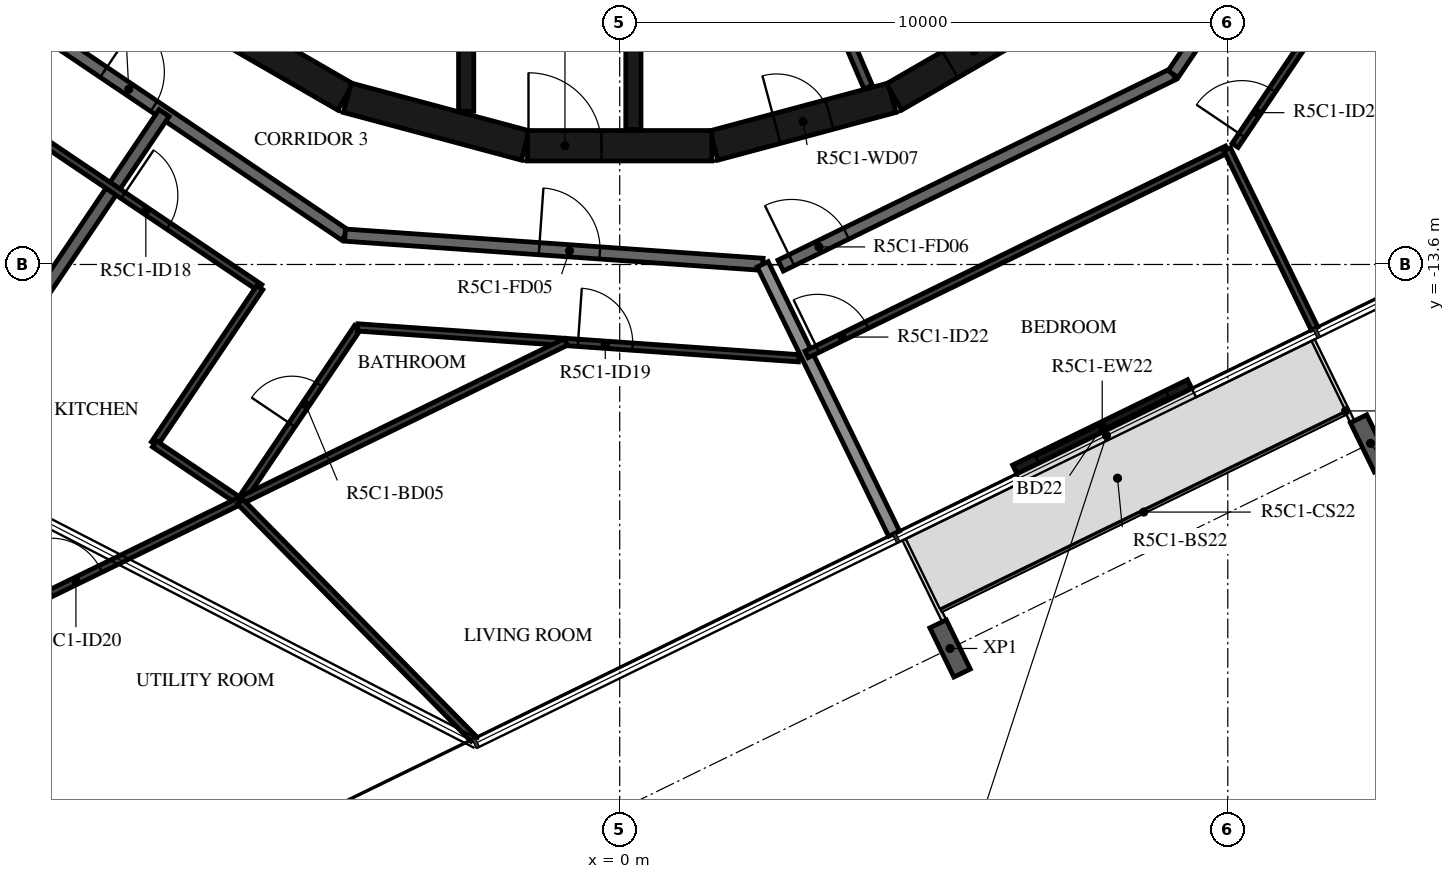
"""IFC4 building model, lengths in metres.
Left out: names, types, materials, properties, quantities, classifications, styles, units other than length and angle.
Written with IfcOpenShell. Run it as: python <this file> out.ifc"""

import sys

from ifc_helpers import new_model, si_unit, direction, frame, frame_2d, origin, origin_2d, place, context, subcontext, project, spatial, rectangle, i_section, extrude, element, fill, save


model = new_model("IFC4")
c1 = context("Model", 3, precision=1e-05, world=origin(), true_north=direction((0.0, 1.0)))
c2 = subcontext(c1, "Body", "Model", "MODEL_VIEW")
j1 = project(units=[si_unit("LENGTHUNIT", "METRE"), si_unit("PLANEANGLEUNIT", "RADIAN")], contexts=[c1])
p1 = place(None, origin())
s1 = spatial("IfcSite", under=j1, at=p1, CompositionType="ELEMENT")
p2 = place(p1, origin())
s2 = spatial("IfcBuilding", under=s1, at=p2, CompositionType="ELEMENT")
p3 = place(p2, frame((0.0, 0.0, 212.9)))
s3 = spatial("IfcBuildingStorey", under=s2, at=p3, CompositionType="ELEMENT", Elevation=212.9)
for number, where, z_axis, x_axis in (
    (1, (12.348, -16.542, -0.38), (0.0, 0.0, 1.0), (-0.899, -0.438, 0.0)),
    (2, (5.433, -19.915, -0.38), (0.0, 0.0, 1.0), (-0.899, -0.438, 0.0)),
):
    element("IfcColumn", number, at=place(p3, frame(where, z_axis=z_axis, x_axis=x_axis)), inside=s3, PredefinedType="COLUMN", context=c2, shape_type="SweptSolid", body=[
        extrude(i_section(OverallWidth=0.3, OverallDepth=0.9, WebThickness=0.019, FlangeThickness=0.035, FilletRadius=0.03, at=origin_2d()), origin(), (0.0, 0.0, 1.0), 3.5),
    ])
p4 = place(p3, frame((6.497, -16.97, 0.0), z_axis=(0.0, 0.0, 1.0), x_axis=(0.898778711213, 0.43840258698, 0.0)))
e3 = element("IfcWall", 3, at=p4, inside=s3, PredefinedType="STANDARD", context=c2, shape_type="SweptSolid", body=[
    extrude(rectangle(XDim=3.2, YDim=0.16, at=frame_2d((1.6, 0.0))), origin(), (0.0, 0.0, 1.0), 3.12),
])
p5 = place(p4, frame((0.4, 0.0, 0.0)))
e4 = element("IfcOpeningElement", 4, at=p5, cuts=e3, PredefinedType="OPENING", context=c2, shape_type="SweptSolid", body=[
    extrude(rectangle(XDim=2.4, YDim=2.4, at=frame_2d((1.2, 1.2))), frame((0.0, 0.09, 0.0), z_axis=(0.0, -1.0, 0.0), x_axis=(1.0, 0.0, 0.0)), (0.0, 0.0, 1.0), 0.18),
])
p6 = place(p3, frame((1.55, -11.643, 0.0), z_axis=(0.0, 0.0, 1.0), x_axis=(0.965948410781, 0.258734743916, 0.0)))
e5 = element("IfcWall", 5, at=p6, inside=s3, PredefinedType="SHEAR", context=c2, shape_type="SweptSolid", body=[
    extrude(rectangle(XDim=3.033, YDim=0.5, at=frame_2d((1.516, 0.0))), origin(), (0.0, 0.0, 1.0), 3.12),
])
p7 = place(p6, frame((1.066, 0.0, 0.0)))
e6 = element("IfcOpeningElement", 6, at=p7, cuts=e5, PredefinedType="OPENING", context=c2, shape_type="SweptSolid", body=[
    extrude(rectangle(XDim=0.9, YDim=2.1, at=frame_2d((0.45, 1.05))), frame((0.0, 0.26, 0.0), z_axis=(0.0, -1.0, 0.0), x_axis=(1.0, 0.0, 0.0)), (0.0, 0.0, 1.0), 0.52),
])
p8 = place(p3, frame((4.51, -10.845, 0.0), z_axis=(0.0, 0.0, 1.0), x_axis=(0.865975092491, 0.500087131594, 0.0)))
e7 = element("IfcWall", 7, at=p8, inside=s3, PredefinedType="SHEAR", context=c2, shape_type="SweptSolid", body=[
    extrude(rectangle(XDim=3.033, YDim=0.5, at=frame_2d((1.516, 0.0))), origin(), (0.0, 0.0, 1.0), 3.12),
])
p9 = place(p8, frame((1.066, 0.0, 0.0)))
e8 = element("IfcOpeningElement", 8, at=p9, cuts=e7, PredefinedType="OPENING", context=c2, shape_type="SweptSolid", body=[
    extrude(rectangle(XDim=0.9, YDim=2.1, at=frame_2d((0.45, 1.05))), frame((0.0, 0.26, 0.0), z_axis=(0.0, -1.0, 0.0), x_axis=(1.0, 0.0, 0.0)), (0.0, 0.0, 1.0), 0.52),
])
for number, where, z_axis, x_axis in (
    (9, (-7.137, -9.329, 0.0), (0.0, 0.0, 1.0), (0.866, -0.5, 0.0)),
    (10, (-4.479, -10.858, 0.0), (0.0, 0.0, 1.0), (0.966, -0.259, 0.0)),
):
    element("IfcWall", number, at=place(p3, frame(where, z_axis=z_axis, x_axis=x_axis)), inside=s3, PredefinedType="SHEAR", context=c2, shape_type="SweptSolid", body=[
        extrude(rectangle(XDim=3.033, YDim=0.5, at=frame_2d((1.516, 0.0))), origin(), (0.0, 0.0, 1.0), 3.12),
    ])
p10 = place(p3, frame((-1.516, -11.647, 0.0), z_axis=(0.0, 0.0, 1.0), x_axis=(1.0, 0.0, 0.0)))
e11 = element("IfcWall", 11, at=p10, inside=s3, PredefinedType="SHEAR", context=c2, shape_type="SweptSolid", body=[
    extrude(rectangle(XDim=3.033, YDim=0.5, at=frame_2d((1.516, 0.0))), origin(), (0.0, 0.0, 1.0), 3.12),
])
p11 = place(p10, frame((0.016, 0.0, 0.0)))
e12 = element("IfcOpeningElement", 12, at=p11, cuts=e11, PredefinedType="OPENING", context=c2, shape_type="SweptSolid", body=[
    extrude(rectangle(XDim=1.2, YDim=2.1, at=frame_2d((0.6, 1.05))), frame((0.0, 0.26, 0.0), z_axis=(0.0, -1.0, 0.0), x_axis=(1.0, 0.0, 0.0)), (0.0, 0.0, 1.0), 0.52),
])
p12 = place(p3, frame((-2.525, -8.97, 0.0), z_axis=(0.0, 0.0, 1.0), x_axis=(0.0, -1.0, 0.0)))
e13 = element("IfcWall", 13, at=p12, inside=s3, PredefinedType="SHEAR", context=c2, shape_type="SweptSolid", body=[
    extrude(rectangle(XDim=2.11, YDim=0.25, at=frame_2d((1.055, 0.0))), origin(), (0.0, 0.0, 1.0), 3.12),
])
p13 = place(p3, frame((0.225, -8.97, 0.0), z_axis=(0.0, 0.0, 1.0), x_axis=(0.0, -1.0, 0.0)))
e14 = element("IfcWall", 14, at=p13, inside=s3, PredefinedType="SHEAR", context=c2, shape_type="SweptSolid", body=[
    extrude(rectangle(XDim=2.41, YDim=0.25, at=frame_2d((1.205, 0.0))), origin(), (0.0, 0.0, 1.0), 3.12),
])
p14 = place(p3, frame((3.367, -9.007, 0.0), z_axis=(0.0, 0.0, 1.0), x_axis=(0.394387482265, -0.918944238696, 0.0)))
e15 = element("IfcWall", 15, at=p14, inside=s3, PredefinedType="PARTITIONING", context=c2, shape_type="SweptSolid", body=[
    extrude(rectangle(XDim=1.825, YDim=0.15, at=frame_2d((0.913, 0.0))), origin(), (0.0, 0.0, 1.0), 3.12),
])
p15 = place(p3, frame((-10.47, -9.101, 0.0), z_axis=(0.0, 0.0, 1.0), x_axis=(0.829035841718, -0.559195469534, 0.0)))
e16 = element("IfcWall", 16, at=p15, inside=s3, PredefinedType="STANDARD", context=c2, shape_type="SweptSolid", body=[
    extrude(rectangle(XDim=7.181, YDim=0.2, at=frame_2d((3.591, 0.0))), origin(), (0.0, 0.0, 1.0), 3.12),
])
p16 = place(p15, frame((2.39, 0.0, 0.0)))
e17 = element("IfcOpeningElement", 17, at=p16, cuts=e16, PredefinedType="OPENING", context=c2, shape_type="SweptSolid", body=[
    extrude(rectangle(XDim=1.0, YDim=2.1, at=frame_2d((0.5, 1.05))), frame((0.0, 0.11, 0.0), z_axis=(0.0, -1.0, 0.0), x_axis=(1.0, 0.0, 0.0)), (0.0, 0.0, 1.0), 0.22),
])
p17 = place(p3, frame((-4.517, -13.117, 0.0), z_axis=(0.0, 0.0, 1.0), x_axis=(0.997564669554, -0.069747616856, 0.0)))
e18 = element("IfcWall", 18, at=p17, inside=s3, PredefinedType="STANDARD", context=c2, shape_type="SweptSolid", body=[
    extrude(rectangle(XDim=6.885, YDim=0.2, at=frame_2d((3.443, 0.0))), origin(), (0.0, 0.0, 1.0), 3.12),
])
p18 = place(p17, frame((3.2, 0.0, 0.0)))
e19 = element("IfcOpeningElement", 19, at=p18, cuts=e18, PredefinedType="OPENING", context=c2, shape_type="SweptSolid", body=[
    extrude(rectangle(XDim=1.0, YDim=2.1, at=frame_2d((0.5, 1.05))), frame((0.0, 0.11, 0.0), z_axis=(0.0, -1.0, 0.0), x_axis=(1.0, 0.0, 0.0)), (0.0, 0.0, 1.0), 0.22),
])
p19 = place(p3, frame((2.647, -13.618, 0.0), z_axis=(0.0, 0.0, 1.0), x_axis=(0.898796543751, 0.438366026218, 0.0)))
e20 = element("IfcWall", 20, at=p19, inside=s3, PredefinedType="STANDARD", context=c2, shape_type="SweptSolid", body=[
    extrude(rectangle(XDim=7.181, YDim=0.2, at=frame_2d((3.591, 0.0))), origin(), (0.0, 0.0, 1.0), 3.12),
])
p20 = place(p19, frame((0.2, 0.0, 0.0)))
e21 = element("IfcOpeningElement", 21, at=p20, cuts=e20, PredefinedType="OPENING", context=c2, shape_type="SweptSolid", body=[
    extrude(rectangle(XDim=1.0, YDim=2.1, at=frame_2d((0.5, 1.05))), frame((0.0, 0.11, 0.0), z_axis=(0.0, -1.0, 0.0), x_axis=(1.0, 0.0, 0.0)), (0.0, 0.0, 1.0), 0.22),
])
p21 = place(p3, frame((9.101, -10.47, 0.0), z_axis=(0.0, 0.0, 1.0), x_axis=(0.559195469534, 0.829035841718, 0.0)))
e22 = element("IfcWall", 22, at=p21, inside=s3, PredefinedType="STANDARD", context=c2, shape_type="SweptSolid", body=[
    extrude(rectangle(XDim=7.181, YDim=0.2, at=frame_2d((3.591, 0.0))), origin(), (0.0, 0.0, 1.0), 3.12),
])
p22 = place(p3, frame((-10.408, -15.43, 0.0), z_axis=(0.0, 0.0, 1.0), x_axis=(0.559199317758, 0.829033246027, 0.0)))
e23 = element("IfcWall", 23, at=p22, inside=s3, PredefinedType="STANDARD", context=c2, shape_type="SweptSolid", body=[
    extrude(rectangle(XDim=5.212, YDim=0.2, at=frame_2d((2.606, 0.0))), origin(), (0.0, 0.0, 1.0), 3.12),
])
p23 = place(p3, frame((4.512, -18.027, 0.0), z_axis=(0.0, 0.0, 1.0), x_axis=(-0.438374835386, 0.898792247241, 0.0)))
e24 = element("IfcWall", 24, at=p23, inside=s3, PredefinedType="STANDARD", context=c2, shape_type="SweptSolid", body=[
    extrude(rectangle(XDim=4.929, YDim=0.2, at=frame_2d((2.464, 0.0))), origin(), (0.0, 0.0, 1.0), 2.73),
])
p24 = place(p3, frame((-11.642, -10.12, 0.0), z_axis=(0.0, 0.0, 1.0), x_axis=(0.829029427133, -0.559204979365, 0.0)))
e25 = element("IfcWall", 25, at=p24, inside=s3, PredefinedType="PARTITIONING", context=c2, shape_type="SweptSolid", body=[
    extrude(rectangle(XDim=6.904, YDim=0.12, at=frame_2d((3.452, 0.0))), origin(), (0.0, 0.0, 1.0), 3.12),
])
p25 = place(p24, frame((0.2, 0.0, 0.0)))
e26 = element("IfcOpeningElement", 26, at=p25, cuts=e25, PredefinedType="OPENING", context=c2, shape_type="SweptSolid", body=[
    extrude(rectangle(XDim=0.9, YDim=2.1, at=frame_2d((0.45, 1.05))), frame((0.0, 0.07, 0.0), z_axis=(0.0, -1.0, 0.0), x_axis=(1.0, 0.0, 0.0)), (0.0, 0.0, 1.0), 0.14),
])
p26 = place(p24, frame((4.192, 0.0, 0.0)))
e27 = element("IfcOpeningElement", 27, at=p26, cuts=e25, PredefinedType="OPENING", context=c2, shape_type="SweptSolid", body=[
    extrude(rectangle(XDim=0.9, YDim=2.1, at=frame_2d((0.45, 1.05))), frame((0.0, 0.07, 0.0), z_axis=(0.0, -1.0, 0.0), x_axis=(1.0, 0.0, 0.0)), (0.0, 0.0, 1.0), 0.14),
])
p27 = place(p3, frame((-5.918, -13.981, 0.0), z_axis=(0.0, 0.0, 1.0), x_axis=(-0.559254999968, -0.828995684555, 0.0)))
e28 = element("IfcWall", 28, at=p27, inside=s3, PredefinedType="PARTITIONING", context=c2, shape_type="SweptSolid", body=[
    extrude(rectangle(XDim=3.099, YDim=0.12, at=frame_2d((1.55, 0.0))), origin(), (0.0, 0.0, 1.0), 3.12),
])
p28 = place(p3, frame((-7.652, -16.55, 0.0), z_axis=(0.0, 0.0, 1.0), x_axis=(0.829053397483, -0.559169441334, 0.0)))
e29 = element("IfcWall", 29, at=p28, inside=s3, PredefinedType="PARTITIONING", context=c2, shape_type="SweptSolid", body=[
    extrude(rectangle(XDim=1.686, YDim=0.12, at=frame_2d((0.843, 0.0))), origin(), (0.0, 0.0, 1.0), 3.12),
])
p29 = place(p3, frame((-6.229, -17.48, 0.0), z_axis=(0.0, 0.0, 1.0), x_axis=(0.559206483048, 0.829028412853, 0.0)))
e30 = element("IfcWall", 30, at=p29, inside=s3, PredefinedType="PARTITIONING", context=c2, shape_type="SweptSolid", body=[
    extrude(rectangle(XDim=3.432, YDim=0.12, at=frame_2d((1.716, 0.0))), origin(), (0.0, 0.0, 1.0), 3.12),
])
p30 = place(p29, frame((1.5, 0.0, 0.0)))
e31 = element("IfcOpeningElement", 31, at=p30, cuts=e30, PredefinedType="OPENING", context=c2, shape_type="SweptSolid", body=[
    extrude(rectangle(XDim=0.8, YDim=2.1, at=frame_2d((0.4, 1.05))), frame((0.0, 0.07, 0.0), z_axis=(0.0, -1.0, 0.0), x_axis=(1.0, 0.0, 0.0)), (0.0, 0.0, 1.0), 0.14),
])
p31 = place(p3, frame((-4.309, -14.635, 0.0), z_axis=(0.0, 0.0, 1.0), x_axis=(0.997564788147, -0.069745920658, 0.0)))
e32 = element("IfcWall", 32, at=p31, inside=s3, PredefinedType="PARTITIONING", context=c2, shape_type="SweptSolid", body=[
    extrude(rectangle(XDim=7.271, YDim=0.12, at=frame_2d((3.635, 0.0))), origin(), (0.0, 0.0, 1.0), 3.12),
])
p32 = place(p31, frame((3.632, 0.0, 0.0)))
e33 = element("IfcOpeningElement", 33, at=p32, cuts=e32, PredefinedType="OPENING", context=c2, shape_type="SweptSolid", body=[
    extrude(rectangle(XDim=0.9, YDim=2.1, at=frame_2d((0.45, 1.05))), frame((0.0, 0.07, 0.0), z_axis=(0.0, -1.0, 0.0), x_axis=(1.0, 0.0, 0.0)), (0.0, 0.0, 1.0), 0.14),
])
p33 = place(p3, frame((-9.886, -19.264, 0.0), z_axis=(0.0, 0.0, 1.0), x_axis=(0.898796326112, 0.43836647245, 0.0)))
e34 = element("IfcWall", 34, at=p33, inside=s3, PredefinedType="PARTITIONING", context=c2, shape_type="SweptSolid", body=[
    extrude(rectangle(XDim=10.014, YDim=0.12, at=frame_2d((5.007, 0.0))), origin(), (0.0, 0.0, 1.0), 3.12),
])
p34 = place(p33, frame((0.6, 0.0, 0.0)))
e35 = element("IfcOpeningElement", 35, at=p34, cuts=e34, PredefinedType="OPENING", context=c2, shape_type="SweptSolid", body=[
    extrude(rectangle(XDim=0.9, YDim=2.1, at=frame_2d((0.45, 1.05))), frame((0.0, 0.07, 0.0), z_axis=(0.0, -1.0, 0.0), x_axis=(1.0, 0.0, 0.0)), (0.0, 0.0, 1.0), 0.14),
])
p35 = place(p3, frame((-9.072, -24.489, 0.0), z_axis=(0.0, 0.0, 1.0), x_axis=(-0.291025348593, 0.956715342449, 0.0)))
e36 = element("IfcWall", 36, at=p35, inside=s3, PredefinedType="PARTITIONING", context=c2, shape_type="SweptSolid", body=[
    extrude(rectangle(XDim=5.205, YDim=0.12, at=frame_2d((2.602, 0.0))), origin(), (0.0, 0.0, 1.0), 3.12),
])
p36 = place(p35, frame((0.2, 0.0, 0.0)))
e37 = element("IfcOpeningElement", 37, at=p36, cuts=e36, PredefinedType="OPENING", context=c2, shape_type="SweptSolid", body=[
    extrude(rectangle(XDim=0.9, YDim=2.1, at=frame_2d((0.45, 1.05))), frame((0.0, 0.07, 0.0), z_axis=(0.0, -1.0, 0.0), x_axis=(1.0, 0.0, 0.0)), (0.0, 0.0, 1.0), 0.14),
])
p37 = place(p3, frame((-2.403, -21.4, 0.0), z_axis=(0.0, 0.0, 1.0), x_axis=(-0.70162063199, 0.712550692067, 0.0)))
e38 = element("IfcWall", 38, at=p37, inside=s3, PredefinedType="PARTITIONING", context=c2, shape_type="SweptSolid", body=[
    extrude(rectangle(XDim=5.472, YDim=0.12, at=frame_2d((2.736, 0.0))), origin(), (0.0, 0.0, 1.0), 3.12),
])
p38 = place(p3, frame((3.074, -15.078, 0.0), z_axis=(0.0, 0.0, 1.0), x_axis=(0.898800770739, 0.438357359377, 0.0)))
e39 = element("IfcWall", 39, at=p38, inside=s3, PredefinedType="PARTITIONING", context=c2, shape_type="SweptSolid", body=[
    extrude(rectangle(XDim=7.694, YDim=0.12, at=frame_2d((3.847, 0.0))), origin(), (0.0, 0.0, 1.0), 3.12),
])
p39 = place(p38, frame((0.2, 0.0, 0.0)))
e40 = element("IfcOpeningElement", 40, at=p39, cuts=e39, PredefinedType="OPENING", context=c2, shape_type="SweptSolid", body=[
    extrude(rectangle(XDim=0.9, YDim=2.1, at=frame_2d((0.45, 1.05))), frame((0.0, 0.07, 0.0), z_axis=(0.0, -1.0, 0.0), x_axis=(1.0, 0.0, 0.0)), (0.0, 0.0, 1.0), 0.14),
])
p40 = place(p3, frame((10.12, -11.642, 0.0), z_axis=(0.0, 0.0, 1.0), x_axis=(0.559201404667, 0.829031838362, 0.0)))
e41 = element("IfcWall", 41, at=p40, inside=s3, PredefinedType="PARTITIONING", context=c2, shape_type="SweptSolid", body=[
    extrude(rectangle(XDim=7.709, YDim=0.12, at=frame_2d((3.854, 0.0))), origin(), (0.0, 0.0, 1.0), 3.12),
])
p41 = place(p40, frame((0.2, 0.0, 0.0)))
e42 = element("IfcOpeningElement", 42, at=p41, cuts=e41, PredefinedType="OPENING", context=c2, shape_type="SweptSolid", body=[
    extrude(rectangle(XDim=0.9, YDim=2.1, at=frame_2d((0.45, 1.05))), frame((0.0, 0.07, 0.0), z_axis=(0.0, -1.0, 0.0), x_axis=(1.0, 0.0, 0.0)), (0.0, 0.0, 1.0), 0.14),
])
p42 = place(p3, frame((11.427, -14.654, 0.0), z_axis=(0.0, 0.0, 1.0), x_axis=(-0.438410435857, 0.898774882677, 0.0)))
e43 = element("IfcWall", 43, at=p42, inside=s3, PredefinedType="PARTITIONING", context=c2, shape_type="SweptSolid", body=[
    extrude(rectangle(XDim=3.281, YDim=0.12, at=frame_2d((1.64, 0.0))), origin(), (0.0, 0.0, 1.0), 2.73),
])
p43 = place(p5, origin())
e44 = element("IfcDoor", 44, at=p43, inside=s3, OperationType="DOUBLE_DOOR_SLIDING", PredefinedType="DOOR", context=c2, shape_type="SweptSolid", body=[
    extrude(rectangle(XDim=2.4, YDim=2.4, at=frame_2d((1.2, 1.2))), frame((0.0, 0.025, 0.0), z_axis=(0.0, -1.0, 0.0), x_axis=(1.0, 0.0, 0.0)), (0.0, 0.0, 1.0), 0.05),
])
fill(e4, e44)
p44 = place(p11, origin())
e45 = element("IfcDoor", 45, at=p44, inside=s3, OperationType="SINGLE_SWING_RIGHT", PredefinedType="DOOR", context=c2, shape_type="SweptSolid", body=[
    extrude(rectangle(XDim=1.2, YDim=2.1, at=frame_2d((0.6, 1.05))), frame((0.0, 0.025, 0.0), z_axis=(0.0, -1.0, 0.0), x_axis=(1.0, 0.0, 0.0)), (0.0, 0.0, 1.0), 0.05),
])
fill(e12, e45)
p45 = place(p7, origin())
e46 = element("IfcDoor", 46, at=p45, inside=s3, OperationType="SINGLE_SWING_LEFT", PredefinedType="DOOR", context=c2, shape_type="SweptSolid", body=[
    extrude(rectangle(XDim=0.9, YDim=2.1, at=frame_2d((0.45, 1.05))), frame((0.0, 0.025, 0.0), z_axis=(0.0, -1.0, 0.0), x_axis=(1.0, 0.0, 0.0)), (0.0, 0.0, 1.0), 0.05),
])
fill(e6, e46)
p46 = place(p9, origin())
e47 = element("IfcDoor", 47, at=p46, inside=s3, OperationType="SINGLE_SWING_RIGHT", PredefinedType="DOOR", context=c2, shape_type="SweptSolid", body=[
    extrude(rectangle(XDim=0.9, YDim=2.1, at=frame_2d((0.45, 1.05))), frame((0.0, 0.025, 0.0), z_axis=(0.0, -1.0, 0.0), x_axis=(1.0, 0.0, 0.0)), (0.0, 0.0, 1.0), 0.05),
])
fill(e8, e47)
p47 = place(p16, origin())
e48 = element("IfcDoor", 48, at=p47, inside=s3, OperationType="SINGLE_SWING_RIGHT", PredefinedType="DOOR", context=c2, shape_type="SweptSolid", body=[
    extrude(rectangle(XDim=1.0, YDim=2.1, at=frame_2d((0.5, 1.05))), frame((0.0, 0.025, 0.0), z_axis=(0.0, -1.0, 0.0), x_axis=(1.0, 0.0, 0.0)), (0.0, 0.0, 1.0), 0.05),
])
fill(e17, e48)
p48 = place(p18, origin())
e49 = element("IfcDoor", 49, at=p48, inside=s3, OperationType="SINGLE_SWING_LEFT", PredefinedType="DOOR", context=c2, shape_type="SweptSolid", body=[
    extrude(rectangle(XDim=1.0, YDim=2.1, at=frame_2d((0.5, 1.05))), frame((0.0, 0.025, 0.0), z_axis=(0.0, -1.0, 0.0), x_axis=(1.0, 0.0, 0.0)), (0.0, 0.0, 1.0), 0.05),
])
fill(e19, e49)
p49 = place(p26, origin())
e50 = element("IfcDoor", 50, at=p49, inside=s3, OperationType="SINGLE_SWING_LEFT", PredefinedType="DOOR", context=c2, shape_type="SweptSolid", body=[
    extrude(rectangle(XDim=0.9, YDim=2.1, at=frame_2d((0.45, 1.05))), frame((0.0, 0.025, 0.0), z_axis=(0.0, -1.0, 0.0), x_axis=(1.0, 0.0, 0.0)), (0.0, 0.0, 1.0), 0.05),
])
fill(e27, e50)
p50 = place(p30, origin())
e51 = element("IfcDoor", 51, at=p50, inside=s3, OperationType="SINGLE_SWING_LEFT", PredefinedType="DOOR", context=c2, shape_type="SweptSolid", body=[
    extrude(rectangle(XDim=0.8, YDim=2.1, at=frame_2d((0.4, 1.05))), frame((0.0, 0.025, 0.0), z_axis=(0.0, -1.0, 0.0), x_axis=(1.0, 0.0, 0.0)), (0.0, 0.0, 1.0), 0.05),
])
fill(e31, e51)
p51 = place(p32, origin())
e52 = element("IfcDoor", 52, at=p51, inside=s3, OperationType="SINGLE_SWING_LEFT", PredefinedType="DOOR", context=c2, shape_type="SweptSolid", body=[
    extrude(rectangle(XDim=0.9, YDim=2.1, at=frame_2d((0.45, 1.05))), frame((0.0, 0.025, 0.0), z_axis=(0.0, -1.0, 0.0), x_axis=(1.0, 0.0, 0.0)), (0.0, 0.0, 1.0), 0.05),
])
fill(e33, e52)
p52 = place(p34, origin())
e53 = element("IfcDoor", 53, at=p52, inside=s3, OperationType="SINGLE_SWING_LEFT", PredefinedType="DOOR", context=c2, shape_type="SweptSolid", body=[
    extrude(rectangle(XDim=0.9, YDim=2.1, at=frame_2d((0.45, 1.05))), frame((0.0, 0.025, 0.0), z_axis=(0.0, -1.0, 0.0), x_axis=(1.0, 0.0, 0.0)), (0.0, 0.0, 1.0), 0.05),
])
fill(e35, e53)
p53 = place(p20, origin())
e54 = element("IfcDoor", 54, at=p53, inside=s3, OperationType="SINGLE_SWING_LEFT", PredefinedType="DOOR", context=c2, shape_type="SweptSolid", body=[
    extrude(rectangle(XDim=1.0, YDim=2.1, at=frame_2d((0.5, 1.05))), frame((0.0, 0.025, 0.0), z_axis=(0.0, -1.0, 0.0), x_axis=(1.0, 0.0, 0.0)), (0.0, 0.0, 1.0), 0.05),
])
fill(e21, e54)
p54 = place(p39, origin())
e55 = element("IfcDoor", 55, at=p54, inside=s3, OperationType="SINGLE_SWING_LEFT", PredefinedType="DOOR", context=c2, shape_type="SweptSolid", body=[
    extrude(rectangle(XDim=0.9, YDim=2.1, at=frame_2d((0.45, 1.05))), frame((0.0, 0.025, 0.0), z_axis=(0.0, -1.0, 0.0), x_axis=(1.0, 0.0, 0.0)), (0.0, 0.0, 1.0), 0.05),
])
fill(e40, e55)
p55 = place(p41, origin())
e56 = element("IfcDoor", 56, at=p55, inside=s3, OperationType="SINGLE_SWING_RIGHT", PredefinedType="DOOR", context=c2, shape_type="SweptSolid", body=[
    extrude(rectangle(XDim=0.9, YDim=2.1, at=frame_2d((0.45, 1.05))), frame((0.0, 0.025, 0.0), z_axis=(0.0, -1.0, 0.0), x_axis=(1.0, 0.0, 0.0)), (0.0, 0.0, 1.0), 0.05),
])
fill(e42, e56)
save(model, sys.argv[1])
